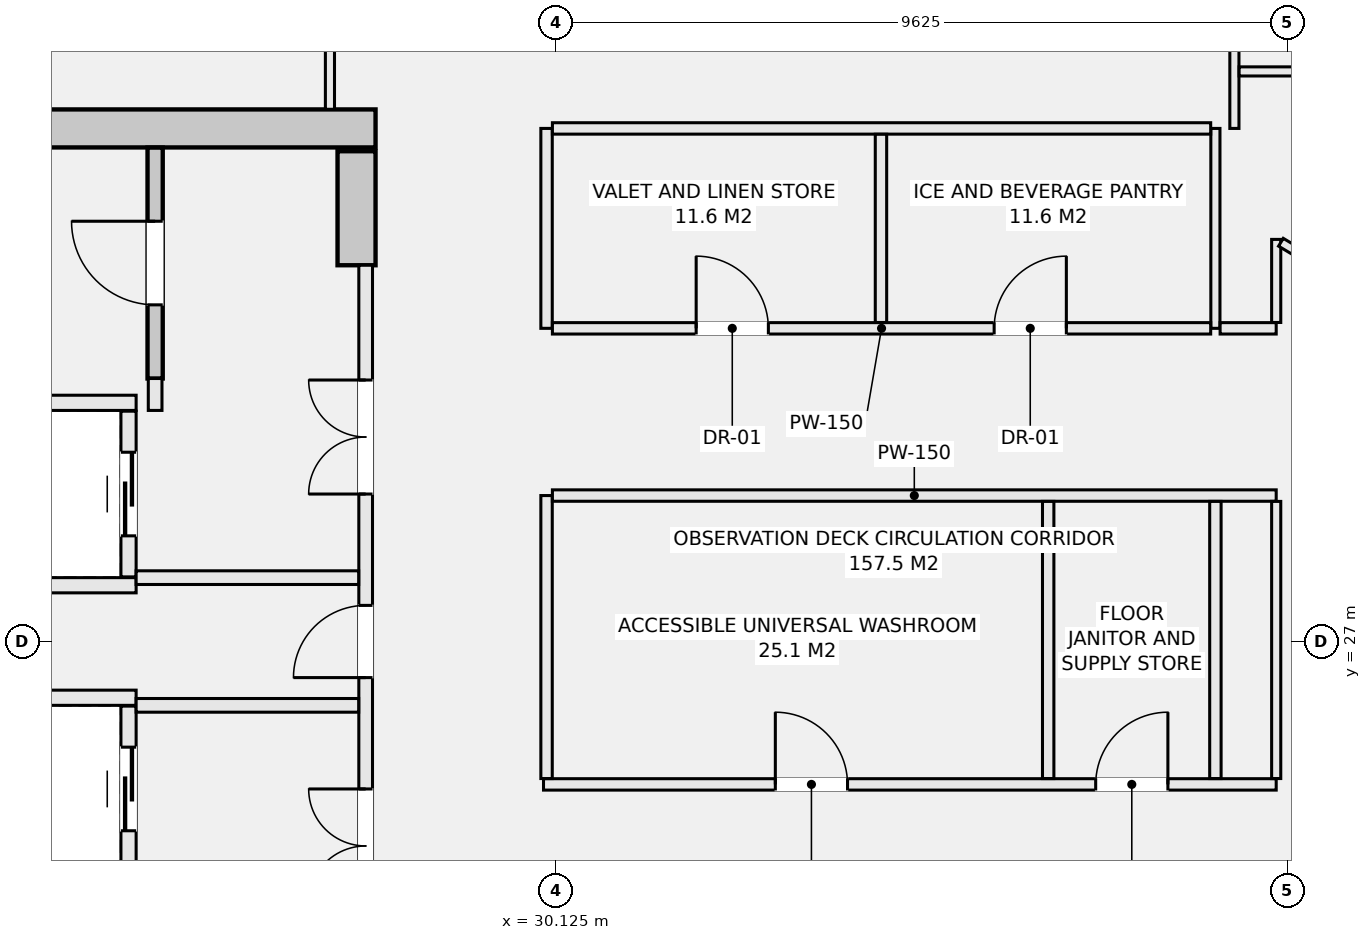
"""IFC4 building model, lengths in metres.
Left out: names, types, materials, properties, quantities, classifications, styles, units other than length and angle.
Written with IfcOpenShell. Run it as: python <this file> out.ifc"""

import sys

from ifc_helpers import new_model, si_unit, direction, frame, frame_2d, origin, place, context, subcontext, project, spatial, rectangle, extrude, element, fill, save


model = new_model("IFC4")
c1 = context("Model", 3, precision=1e-05, world=origin(), true_north=direction((0.0, 1.0)))
c2 = subcontext(c1, "Body", "Model", "MODEL_VIEW")
j1 = project(units=[si_unit("LENGTHUNIT", "METRE"), si_unit("PLANEANGLEUNIT", "RADIAN")], contexts=[c1])
p1 = place(None, origin())
s1 = spatial("IfcSite", under=j1, at=p1, CompositionType="ELEMENT")
p2 = place(p1, origin())
s2 = spatial("IfcBuilding", under=s1, at=p2, CompositionType="ELEMENT")
p3 = place(p2, frame((0.0, 0.0, 281.6)))
s3 = spatial("IfcBuildingStorey", under=s2, at=p3, CompositionType="ELEMENT", Elevation=281.6)
p4 = place(p3, frame((14.25, 33.75, -0.28), z_axis=(0.0, 0.0, 1.0), x_axis=(1.0, 0.0, 0.0)))
e1 = element("IfcWall", 1, at=p4, inside=s3, PredefinedType="SHEAR", context=c2, shape_type="SweptSolid", body=[
    extrude(rectangle(XDim=13.5, YDim=0.5, at=frame_2d((6.75, 0.0))), origin(), (0.0, 0.0, 1.0), 5.78),
])
p5 = place(p3, frame((27.5, 31.95, -0.28), z_axis=(0.0, 0.0, 1.0), x_axis=(0.0, 1.0, 0.0)))
e2 = element("IfcWall", 2, at=p5, inside=s3, PredefinedType="SHEAR", context=c2, shape_type="SweptSolid", body=[
    extrude(rectangle(XDim=1.5, YDim=0.5, at=frame_2d((0.75, 0.0))), origin(), (0.0, 0.0, 1.0), 5.78),
])
p6 = place(p3, frame((24.85, 30.46, -0.28), z_axis=(0.0, 0.0, 1.0), x_axis=(0.0, 1.0, 0.0)))
e3 = element("IfcWall", 3, at=p6, inside=s3, PredefinedType="SHEAR", context=c2, shape_type="SweptSolid", body=[
    extrude(rectangle(XDim=3.038, YDim=0.2, at=frame_2d((1.519, 0.0))), origin(), (0.0, 0.0, 1.0), 5.78),
])
p7 = place(p6, frame((0.969, 0.0, 0.28)))
e4 = element("IfcOpeningElement", 4, at=p7, cuts=e3, PredefinedType="OPENING", context=c2, shape_type="SweptSolid", body=[
    extrude(rectangle(XDim=1.1, YDim=2.15, at=frame_2d((0.55, 1.075))), frame((0.0, 0.11, 0.0), z_axis=(0.0, -1.0, 0.0), x_axis=(1.0, 0.0, 0.0)), (0.0, 0.0, 1.0), 0.22),
])
for number, where, z_axis, x_axis in (
    (5, (22.15, 30.14, 0.0), (0.0, 0.0, 1.0), (1.0, 0.0, 0.0)),
    (6, (22.15, 27.74, 0.0), (0.0, 0.0, 1.0), (1.0, 0.0, 0.0)),
):
    element("IfcWall", number, at=place(p3, frame(where, z_axis=z_axis, x_axis=x_axis)), inside=s3, PredefinedType="SOLIDWALL", context=c2, shape_type="SweptSolid", body=[
        extrude(rectangle(XDim=2.45, YDim=0.2, at=frame_2d((1.225, 0.0))), origin(), (0.0, 0.0, 1.0), 5.5),
    ])
p8 = place(p3, frame((24.5, 27.85, 0.0), z_axis=(0.0, 0.0, 1.0), x_axis=(0.0, 1.0, 0.0)))
e7 = element("IfcWall", 7, at=p8, inside=s3, PredefinedType="SOLIDWALL", context=c2, shape_type="SweptSolid", body=[
    extrude(rectangle(XDim=2.18, YDim=0.2, at=frame_2d((1.09, 0.0))), origin(), (0.0, 0.0, 1.0), 5.5),
])
p9 = place(p8, frame((0.54, 0.0, 0.0)))
e8 = element("IfcOpeningElement", 8, at=p9, cuts=e7, PredefinedType="OPENING", context=c2, shape_type="SweptSolid", body=[
    extrude(rectangle(XDim=1.1, YDim=2.2, at=frame_2d((0.55, 1.1))), frame((0.0, 0.11, 0.0), z_axis=(0.0, -1.0, 0.0), x_axis=(1.0, 0.0, 0.0)), (0.0, 0.0, 1.0), 0.22),
])
p10 = place(p3, frame((22.15, 26.26, 0.0), z_axis=(0.0, 0.0, 1.0), x_axis=(1.0, 0.0, 0.0)))
e9 = element("IfcWall", 9, at=p10, inside=s3, PredefinedType="SOLIDWALL", context=c2, shape_type="SweptSolid", body=[
    extrude(rectangle(XDim=2.45, YDim=0.2, at=frame_2d((1.225, 0.0))), origin(), (0.0, 0.0, 1.0), 5.5),
])
p11 = place(p3, frame((24.5, 23.97, 0.0), z_axis=(0.0, 0.0, 1.0), x_axis=(0.0, 1.0, 0.0)))
e10 = element("IfcWall", 10, at=p11, inside=s3, PredefinedType="SOLIDWALL", context=c2, shape_type="SweptSolid", body=[
    extrude(rectangle(XDim=2.18, YDim=0.2, at=frame_2d((1.09, 0.0))), origin(), (0.0, 0.0, 1.0), 5.5),
])
p12 = place(p11, frame((0.54, 0.0, 0.0)))
e11 = element("IfcOpeningElement", 11, at=p12, cuts=e10, PredefinedType="OPENING", context=c2, shape_type="SweptSolid", body=[
    extrude(rectangle(XDim=1.1, YDim=2.2, at=frame_2d((0.55, 1.1))), frame((0.0, 0.11, 0.0), z_axis=(0.0, -1.0, 0.0), x_axis=(1.0, 0.0, 0.0)), (0.0, 0.0, 1.0), 0.22),
])
p13 = place(p3, frame((24.85, 30.04, 0.0), z_axis=(0.0, 0.0, 1.0), x_axis=(0.0, 1.0, 0.0)))
e12 = element("IfcWall", 12, at=p13, inside=s3, PredefinedType="SOLIDWALL", context=c2, shape_type="SweptSolid", body=[
    extrude(rectangle(XDim=0.42, YDim=0.18, at=frame_2d((0.21, 0.0))), origin(), (0.0, 0.0, 1.0), 5.5),
])
p14 = place(p3, frame((27.62, 22.05, 0.0), z_axis=(0.0, 0.0, 1.0), x_axis=(0.0, 1.0, 0.0)))
e13 = element("IfcWall", 13, at=p14, inside=s3, PredefinedType="SOLIDWALL", context=c2, shape_type="SweptSolid", body=[
    extrude(rectangle(XDim=9.9, YDim=0.18, at=frame_2d((4.95, 0.0))), origin(), (0.0, 0.0, 1.0), 4.592),
])
p15 = place(p14, frame((4.475, 0.0, 0.0)))
e14 = element("IfcOpeningElement", 14, at=p15, cuts=e13, PredefinedType="OPENING", context=c2, shape_type="SweptSolid", body=[
    extrude(rectangle(XDim=0.95, YDim=2.1, at=frame_2d((0.475, 1.05))), frame((0.0, 0.1, 0.0), z_axis=(0.0, -1.0, 0.0), x_axis=(1.0, 0.0, 0.0)), (0.0, 0.0, 1.0), 0.2),
])
p16 = place(p14, frame((6.89, 0.0, 0.0)))
e15 = element("IfcOpeningElement", 15, at=p16, cuts=e13, PredefinedType="OPENING", context=c2, shape_type="SweptSolid", body=[
    extrude(rectangle(XDim=1.5, YDim=2.2, at=frame_2d((0.75, 1.1))), frame((0.0, 0.1, 0.0), z_axis=(0.0, -1.0, 0.0), x_axis=(1.0, 0.0, 0.0)), (0.0, 0.0, 1.0), 0.2),
])
p17 = place(p14, frame((1.51, 0.0, 0.0)))
e16 = element("IfcOpeningElement", 16, at=p17, cuts=e13, PredefinedType="OPENING", context=c2, shape_type="SweptSolid", body=[
    extrude(rectangle(XDim=1.5, YDim=2.2, at=frame_2d((0.75, 1.1))), frame((0.0, 0.1, 0.0), z_axis=(0.0, -1.0, 0.0), x_axis=(1.0, 0.0, 0.0)), (0.0, 0.0, 1.0), 0.2),
])
for number, where, z_axis, x_axis in (
    (17, (24.6, 27.84, 0.0), (0.0, 0.0, 1.0), (1.0, 0.0, 0.0)),
    (18, (24.6, 26.16, 0.0), (0.0, 0.0, 1.0), (1.0, 0.0, 0.0)),
):
    element("IfcWall", number, at=place(p3, frame(where, z_axis=z_axis, x_axis=x_axis)), inside=s3, PredefinedType="SOLIDWALL", context=c2, shape_type="SweptSolid", body=[
        extrude(rectangle(XDim=2.928, YDim=0.18, at=frame_2d((1.464, 0.0))), origin(), (0.0, 0.0, 1.0), 5.5),
    ])
p18 = place(p3, frame((27.15, 34.002, 0.0), z_axis=(0.0, 0.0, 1.0), x_axis=(0.0, 1.0, 0.0)))
e19 = element("IfcWall", 19, at=p18, inside=s3, PredefinedType="PARTITIONING", context=c2, shape_type="SweptSolid", body=[
    extrude(rectangle(XDim=4.198, YDim=0.12, at=frame_2d((2.099, 0.0))), origin(), (0.0, 0.0, 1.0), 5.5),
])
p19 = place(p18, frame((1.624, 0.0, 0.0)))
e20 = element("IfcOpeningElement", 20, at=p19, cuts=e19, PredefinedType="OPENING", context=c2, shape_type="SweptSolid", body=[
    extrude(rectangle(XDim=0.95, YDim=2.1, at=frame_2d((0.475, 1.05))), frame((0.0, 0.07, 0.0), z_axis=(0.0, -1.0, 0.0), x_axis=(1.0, 0.0, 0.0)), (0.0, 0.0, 1.0), 0.14),
])
p20 = place(p3, frame((29.96, 25.12, 0.0), z_axis=(0.0, 0.0, 1.0), x_axis=(1.0, 0.0, 0.0)))
e21 = element("IfcWall", 21, at=p20, inside=s3, PredefinedType="PARTITIONING", context=c2, shape_type="SweptSolid", body=[
    extrude(rectangle(XDim=9.64, YDim=0.15, at=frame_2d((4.82, 0.0))), origin(), (0.0, 0.0, 1.0), 5.5),
])
p21 = place(p20, frame((3.05, 0.0, 0.0)))
e22 = element("IfcOpeningElement", 22, at=p21, cuts=e21, PredefinedType="OPENING", context=c2, shape_type="SweptSolid", body=[
    extrude(rectangle(XDim=0.95, YDim=2.1, at=frame_2d((0.475, 1.05))), frame((0.0, 0.085, 0.0), z_axis=(0.0, -1.0, 0.0), x_axis=(1.0, 0.0, 0.0)), (0.0, 0.0, 1.0), 0.17),
])
p22 = place(p20, frame((7.265, 0.0, 0.0)))
e23 = element("IfcOpeningElement", 23, at=p22, cuts=e21, PredefinedType="OPENING", context=c2, shape_type="SweptSolid", body=[
    extrude(rectangle(XDim=0.95, YDim=2.1, at=frame_2d((0.475, 1.05))), frame((0.0, 0.085, 0.0), z_axis=(0.0, -1.0, 0.0), x_axis=(1.0, 0.0, 0.0)), (0.0, 0.0, 1.0), 0.17),
])
p23 = place(p3, frame((30.0, 25.197, 0.0), z_axis=(0.0, 0.0, 1.0), x_axis=(0.0, 1.0, 0.0)))
e24 = element("IfcWall", 24, at=p23, inside=s3, PredefinedType="PARTITIONING", context=c2, shape_type="SweptSolid", body=[
    extrude(rectangle(XDim=3.723, YDim=0.15, at=frame_2d((1.861, 0.0))), origin(), (0.0, 0.0, 1.0), 5.5),
])
p24 = place(p3, frame((30.0, 31.12, 0.0), z_axis=(0.0, 0.0, 1.0), x_axis=(0.0, 1.0, 0.0)))
e25 = element("IfcWall", 25, at=p24, inside=s3, PredefinedType="PARTITIONING", context=c2, shape_type="SweptSolid", body=[
    extrude(rectangle(XDim=2.63, YDim=0.15, at=frame_2d((1.315, 0.0))), origin(), (0.0, 0.0, 1.0), 5.5),
])
p25 = place(p3, frame((30.077, 28.92, 0.0), z_axis=(0.0, 0.0, 1.0), x_axis=(1.0, 0.0, 0.0)))
e26 = element("IfcWall", 26, at=p25, inside=s3, PredefinedType="PARTITIONING", context=c2, shape_type="SweptSolid", body=[
    extrude(rectangle(XDim=9.523, YDim=0.15, at=frame_2d((4.762, 0.0))), origin(), (0.0, 0.0, 1.0), 5.5),
])
for number, where, z_axis, x_axis in (
    (27, (36.6, 25.197, 0.0), (0.0, 0.0, 1.0), (0.0, 1.0, 0.0)),
    (28, (38.8, 25.197, 0.0), (0.0, 0.0, 1.0), (0.0, 1.0, 0.0)),
):
    element("IfcWall", number, at=place(p3, frame(where, z_axis=z_axis, x_axis=x_axis)), inside=s3, PredefinedType="PARTITIONING", context=c2, shape_type="SweptSolid", body=[
        extrude(rectangle(XDim=3.646, YDim=0.15, at=frame_2d((1.823, 0.0))), origin(), (0.0, 0.0, 1.0), 5.5),
    ])
p26 = place(p3, frame((38.8, 31.12, 0.0), z_axis=(0.0, 0.0, 1.0), x_axis=(0.0, 1.0, 0.0)))
e29 = element("IfcWall", 29, at=p26, inside=s3, PredefinedType="PARTITIONING", context=c2, shape_type="SweptSolid", body=[
    extrude(rectangle(XDim=2.63, YDim=0.12, at=frame_2d((1.315, 0.0))), origin(), (0.0, 0.0, 1.0), 5.5),
])
p27 = place(p3, frame((30.077, 31.12, 0.0), z_axis=(0.0, 0.0, 1.0), x_axis=(1.0, 0.0, 0.0)))
e30 = element("IfcWall", 30, at=p27, inside=s3, PredefinedType="PARTITIONING", context=c2, shape_type="SweptSolid", body=[
    extrude(rectangle(XDim=8.661, YDim=0.15, at=frame_2d((4.331, 0.0))), origin(), (0.0, 0.0, 1.0), 5.5),
])
p28 = place(p27, frame((1.892, 0.0, 0.0)))
e31 = element("IfcOpeningElement", 31, at=p28, cuts=e30, PredefinedType="OPENING", context=c2, shape_type="SweptSolid", body=[
    extrude(rectangle(XDim=0.95, YDim=2.1, at=frame_2d((0.475, 1.05))), frame((0.0, 0.085, 0.0), z_axis=(0.0, -1.0, 0.0), x_axis=(1.0, 0.0, 0.0)), (0.0, 0.0, 1.0), 0.17),
])
p29 = place(p27, frame((5.812, 0.0, 0.0)))
e32 = element("IfcOpeningElement", 32, at=p29, cuts=e30, PredefinedType="OPENING", context=c2, shape_type="SweptSolid", body=[
    extrude(rectangle(XDim=0.95, YDim=2.1, at=frame_2d((0.475, 1.05))), frame((0.0, 0.085, 0.0), z_axis=(0.0, -1.0, 0.0), x_axis=(1.0, 0.0, 0.0)), (0.0, 0.0, 1.0), 0.17),
])
p30 = place(p3, frame((38.862, 31.12, 0.0), z_axis=(0.0, 0.0, 1.0), x_axis=(1.0, 0.0, 0.0)))
e33 = element("IfcWall", 33, at=p30, inside=s3, PredefinedType="PARTITIONING", context=c2, shape_type="SweptSolid", body=[
    extrude(rectangle(XDim=0.738, YDim=0.15, at=frame_2d((0.369, 0.0))), origin(), (0.0, 0.0, 1.0), 5.5),
])
p31 = place(p3, frame((30.077, 33.75, 0.0), z_axis=(0.0, 0.0, 1.0), x_axis=(1.0, 0.0, 0.0)))
e34 = element("IfcWall", 34, at=p31, inside=s3, PredefinedType="PARTITIONING", context=c2, shape_type="SweptSolid", body=[
    extrude(rectangle(XDim=8.661, YDim=0.15, at=frame_2d((4.331, 0.0))), origin(), (0.0, 0.0, 1.0), 5.5),
])
p32 = place(p3, frame((34.4, 31.197, 0.0), z_axis=(0.0, 0.0, 1.0), x_axis=(0.0, 1.0, 0.0)))
e35 = element("IfcWall", 35, at=p32, inside=s3, PredefinedType="PARTITIONING", context=c2, shape_type="SweptSolid", body=[
    extrude(rectangle(XDim=2.476, YDim=0.15, at=frame_2d((1.238, 0.0))), origin(), (0.0, 0.0, 1.0), 5.5),
])
p33 = place(p3, frame((39.05, 33.75, 0.0), z_axis=(0.0, 0.0, 1.0), x_axis=(0.0, 1.0, 0.0)))
e36 = element("IfcWall", 36, at=p33, inside=s3, PredefinedType="PARTITIONING", context=c2, shape_type="SweptSolid", body=[
    extrude(rectangle(XDim=1.938, YDim=0.12, at=frame_2d((0.969, 0.0))), origin(), (0.0, 0.0, 1.0), 5.5),
])
p34 = place(p3, frame((39.6, 25.197, 0.0), z_axis=(0.0, 0.0, 1.0), x_axis=(0.0, 1.0, 0.0)))
e37 = element("IfcWall", 37, at=p34, inside=s3, PredefinedType="PARTITIONING", context=c2, shape_type="SweptSolid", body=[
    extrude(rectangle(XDim=3.646, YDim=0.12, at=frame_2d((1.823, 0.0))), origin(), (0.0, 0.0, 1.0), 5.5),
])
p35 = place(p3, frame((39.6, 31.197, 0.0), z_axis=(0.0, 0.0, 1.0), x_axis=(0.0, 1.0, 0.0)))
e38 = element("IfcWall", 38, at=p35, inside=s3, PredefinedType="PARTITIONING", context=c2, shape_type="SweptSolid", body=[
    extrude(rectangle(XDim=1.093, YDim=0.12, at=frame_2d((0.546, 0.0))), origin(), (0.0, 0.0, 1.0), 5.5),
])
p36 = place(p3, frame((39.662, 32.253, 0.0), z_axis=(0.0, 0.0, 1.0), x_axis=(0.857688234944, -0.514170099908, 0.0)))
e39 = element("IfcWall", 39, at=p36, inside=s3, PredefinedType="PARTITIONING", context=c2, shape_type="SweptSolid", body=[
    extrude(rectangle(XDim=1.544, YDim=0.12, at=frame_2d((0.772, 0.0))), origin(), (0.0, 0.0, 1.0), 5.5),
])
p37 = place(p3, frame((39.112, 34.5, 0.0), z_axis=(0.0, 0.0, 1.0), x_axis=(1.0, 0.0, 0.0)))
e40 = element("IfcWall", 40, at=p37, inside=s3, PredefinedType="PARTITIONING", context=c2, shape_type="SweptSolid", body=[
    extrude(rectangle(XDim=7.482, YDim=0.12, at=frame_2d((3.741, 0.0))), origin(), (0.0, 0.0, 1.0), 4.292),
])
p38 = place(p7, origin())
e41 = element("IfcDoor", 41, at=p38, inside=s3, OperationType="SINGLE_SWING_RIGHT", PredefinedType="DOOR", context=c2, shape_type="SweptSolid", body=[
    extrude(rectangle(XDim=1.1, YDim=2.15, at=frame_2d((0.55, 1.075))), frame((0.0, 0.025, 0.0), z_axis=(0.0, -1.0, 0.0), x_axis=(1.0, 0.0, 0.0)), (0.0, 0.0, 1.0), 0.05),
])
fill(e4, e41)
p39 = place(p9, origin())
e42 = element("IfcDoor", 42, at=p39, inside=s3, OperationType="SLIDING_TO_LEFT", PredefinedType="DOOR", context=c2, shape_type="SweptSolid", body=[
    extrude(rectangle(XDim=1.1, YDim=2.2, at=frame_2d((0.55, 1.1))), frame((0.0, 0.025, 0.0), z_axis=(0.0, -1.0, 0.0), x_axis=(1.0, 0.0, 0.0)), (0.0, 0.0, 1.0), 0.05),
])
fill(e8, e42)
p40 = place(p12, origin())
e43 = element("IfcDoor", 43, at=p40, inside=s3, OperationType="SLIDING_TO_LEFT", PredefinedType="DOOR", context=c2, shape_type="SweptSolid", body=[
    extrude(rectangle(XDim=1.1, YDim=2.2, at=frame_2d((0.55, 1.1))), frame((0.0, 0.025, 0.0), z_axis=(0.0, -1.0, 0.0), x_axis=(1.0, 0.0, 0.0)), (0.0, 0.0, 1.0), 0.05),
])
fill(e11, e43)
p41 = place(p15, origin())
e44 = element("IfcDoor", 44, at=p41, inside=s3, OperationType="SINGLE_SWING_LEFT", PredefinedType="DOOR", context=c2, shape_type="SweptSolid", body=[
    extrude(rectangle(XDim=0.95, YDim=2.1, at=frame_2d((0.475, 1.05))), frame((0.0, 0.025, 0.0), z_axis=(0.0, -1.0, 0.0), x_axis=(1.0, 0.0, 0.0)), (0.0, 0.0, 1.0), 0.05),
])
fill(e14, e44)
p42 = place(p16, origin())
e45 = element("IfcDoor", 45, at=p42, inside=s3, OperationType="DOUBLE_DOOR_SINGLE_SWING", PredefinedType="DOOR", context=c2, shape_type="SweptSolid", body=[
    extrude(rectangle(XDim=1.5, YDim=2.2, at=frame_2d((0.75, 1.1))), frame((0.0, 0.025, 0.0), z_axis=(0.0, -1.0, 0.0), x_axis=(1.0, 0.0, 0.0)), (0.0, 0.0, 1.0), 0.05),
])
fill(e15, e45)
p43 = place(p17, origin())
e46 = element("IfcDoor", 46, at=p43, inside=s3, OperationType="DOUBLE_DOOR_SINGLE_SWING", PredefinedType="DOOR", context=c2, shape_type="SweptSolid", body=[
    extrude(rectangle(XDim=1.5, YDim=2.2, at=frame_2d((0.75, 1.1))), frame((0.0, 0.025, 0.0), z_axis=(0.0, -1.0, 0.0), x_axis=(1.0, 0.0, 0.0)), (0.0, 0.0, 1.0), 0.05),
])
fill(e16, e46)
p44 = place(p21, origin())
e47 = element("IfcDoor", 47, at=p44, inside=s3, OperationType="SINGLE_SWING_LEFT", PredefinedType="DOOR", context=c2, shape_type="SweptSolid", body=[
    extrude(rectangle(XDim=0.95, YDim=2.1, at=frame_2d((0.475, 1.05))), frame((0.0, 0.025, 0.0), z_axis=(0.0, -1.0, 0.0), x_axis=(1.0, 0.0, 0.0)), (0.0, 0.0, 1.0), 0.05),
])
fill(e22, e47)
p45 = place(p22, origin())
e48 = element("IfcDoor", 48, at=p45, inside=s3, OperationType="SINGLE_SWING_RIGHT", PredefinedType="DOOR", context=c2, shape_type="SweptSolid", body=[
    extrude(rectangle(XDim=0.95, YDim=2.1, at=frame_2d((0.475, 1.05))), frame((0.0, 0.025, 0.0), z_axis=(0.0, -1.0, 0.0), x_axis=(1.0, 0.0, 0.0)), (0.0, 0.0, 1.0), 0.05),
])
fill(e23, e48)
p46 = place(p28, origin())
e49 = element("IfcDoor", 49, at=p46, inside=s3, OperationType="SINGLE_SWING_LEFT", PredefinedType="DOOR", context=c2, shape_type="SweptSolid", body=[
    extrude(rectangle(XDim=0.95, YDim=2.1, at=frame_2d((0.475, 1.05))), frame((0.0, 0.025, 0.0), z_axis=(0.0, -1.0, 0.0), x_axis=(1.0, 0.0, 0.0)), (0.0, 0.0, 1.0), 0.05),
])
fill(e31, e49)
p47 = place(p29, origin())
e50 = element("IfcDoor", 50, at=p47, inside=s3, OperationType="SINGLE_SWING_RIGHT", PredefinedType="DOOR", context=c2, shape_type="SweptSolid", body=[
    extrude(rectangle(XDim=0.95, YDim=2.1, at=frame_2d((0.475, 1.05))), frame((0.0, 0.025, 0.0), z_axis=(0.0, -1.0, 0.0), x_axis=(1.0, 0.0, 0.0)), (0.0, 0.0, 1.0), 0.05),
])
fill(e32, e50)
save(model, sys.argv[1])
